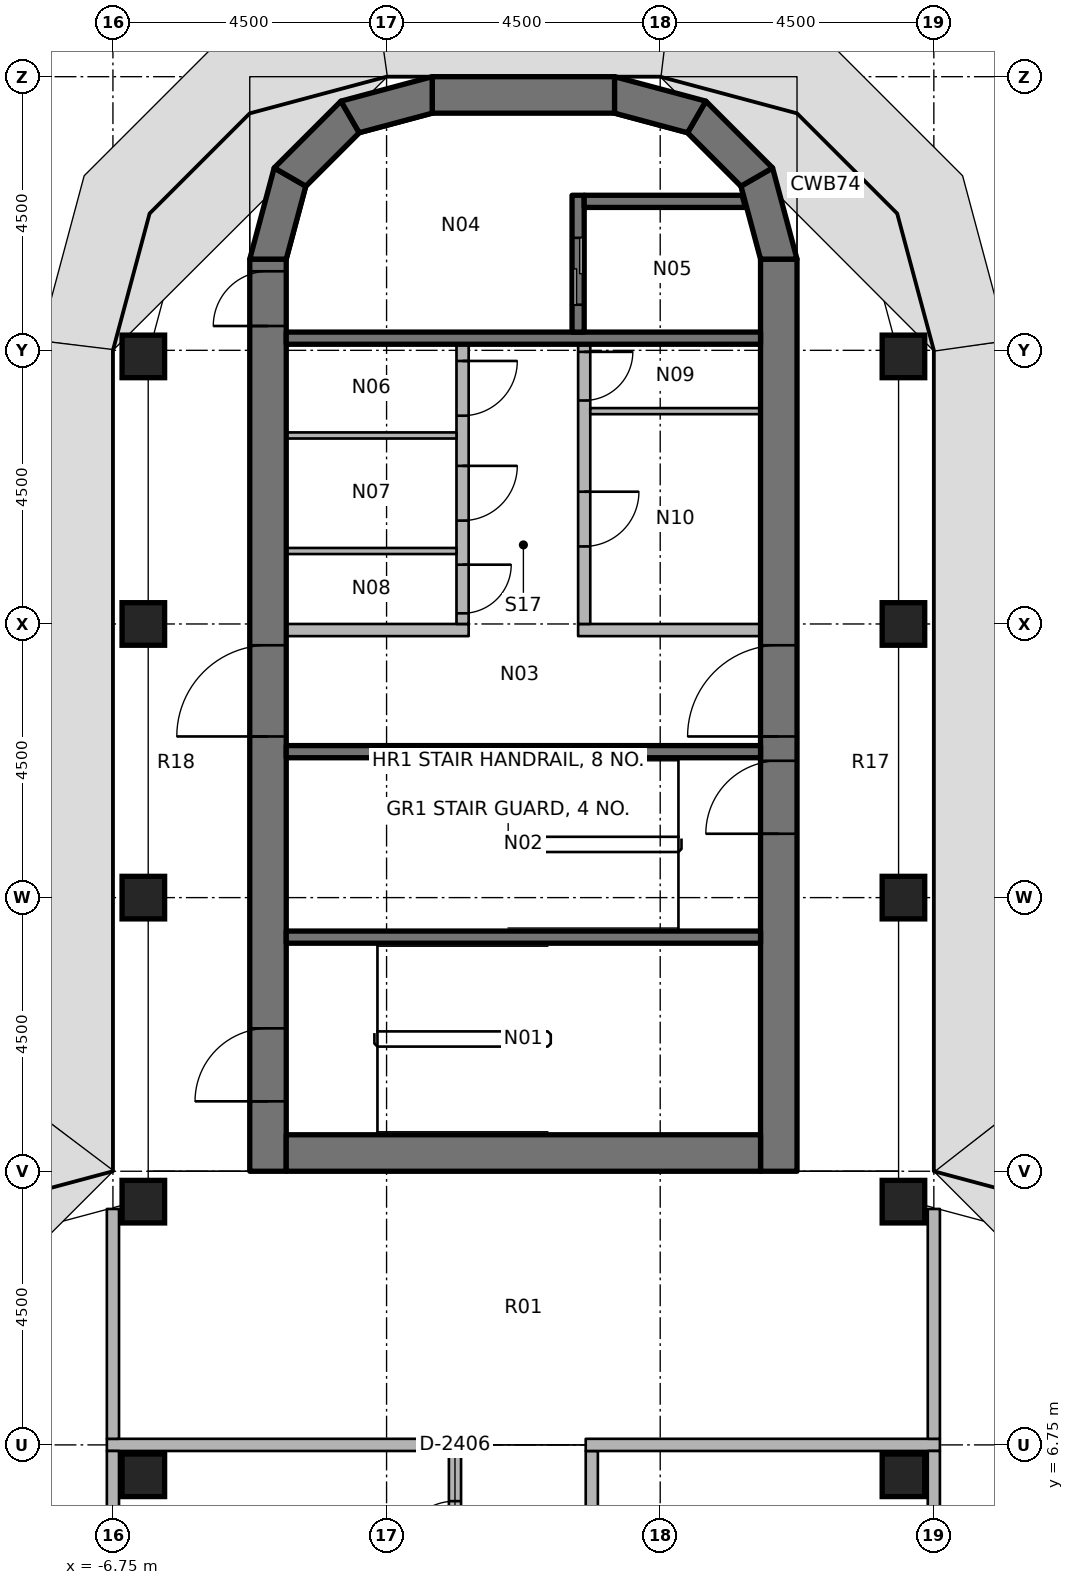
"""IFC4 building model, lengths in metres.
Left out: names, types, materials, properties, quantities, classifications, styles, units other than length and angle.
Written with IfcOpenShell. Run it as: python <this file> out.ifc"""

import sys

from ifc_helpers import new_model, si_unit, direction, frame, frame_2d, origin, origin_2d, place, context, subcontext, project, spatial, polyline, rectangle, outline, extrude, element, fill, save


model = new_model("IFC4")
c1 = context("Model", 3, precision=1e-05, world=origin(), true_north=direction((0.0, 1.0)))
c2 = subcontext(c1, "Body", "Model", "MODEL_VIEW")
j1 = project(units=[si_unit("LENGTHUNIT", "METRE"), si_unit("PLANEANGLEUNIT", "RADIAN")], contexts=[c1])
p1 = place(None, origin())
s1 = spatial("IfcSite", under=j1, at=p1, CompositionType="ELEMENT")
p2 = place(p1, origin())
s2 = spatial("IfcBuilding", under=s1, at=p2, CompositionType="ELEMENT")
p3 = place(p2, frame((0.0, 0.0, 222.0)))
s3 = spatial("IfcBuildingStorey", under=s2, at=p3, CompositionType="ELEMENT", Elevation=222.0)
for number, where, z_axis, x_axis in (
    (1, (-6.25, 6.25, 0.0), (0.0, 0.0, 1.0), (1.0, 0.0, 0.0)),
    (2, (-6.25, 10.75, 0.0), (0.0, 0.0, 1.0), (1.0, 0.0, 0.0)),
    (3, (-6.25, 15.75, 0.0), (0.0, 0.0, 1.0), (1.0, 0.0, 0.0)),
    (4, (-6.25, 20.25, 0.0), (0.0, 0.0, 1.0), (1.0, 0.0, 0.0)),
    (5, (-6.25, 24.65, 0.0), (0.0, 0.0, 1.0), (1.0, 0.0, 0.0)),
    (6, (6.25, 6.25, 0.0), (0.0, 0.0, 1.0), (1.0, 0.0, 0.0)),
    (7, (6.25, 10.75, 0.0), (0.0, 0.0, 1.0), (1.0, 0.0, 0.0)),
    (8, (6.25, 15.75, 0.0), (0.0, 0.0, 1.0), (1.0, 0.0, 0.0)),
    (9, (6.25, 20.25, 0.0), (0.0, 0.0, 1.0), (1.0, 0.0, 0.0)),
    (10, (6.25, 24.65, 0.0), (0.0, 0.0, 1.0), (1.0, 0.0, 0.0)),
):
    element("IfcColumn", number, at=place(p3, frame(where, z_axis=z_axis, x_axis=x_axis)), inside=s3, PredefinedType="COLUMN", context=c2, shape_type="SweptSolid", body=[
        extrude(rectangle(XDim=0.7, YDim=0.7, at=origin_2d()), origin(), (0.0, 0.0, 1.0), 3.65),
    ])
p4 = place(p3, frame((-4.2, 11.25, 0.0), z_axis=(0.0, 0.0, 1.0), x_axis=(0.0, 1.0, 0.0)))
e11 = element("IfcWall", 11, at=p4, inside=s3, PredefinedType="SHEAR", context=c2, shape_type="SweptSolid", body=[
    extrude(rectangle(XDim=15.0, YDim=0.6, at=frame_2d((7.5, 0.0))), origin(), (0.0, 0.0, 1.0), 3.8),
])
p5 = place(p4, frame((7.15, 0.0, 0.0)))
e12 = element("IfcOpeningElement", 12, at=p5, cuts=e11, PredefinedType="OPENING", context=c2, shape_type="SweptSolid", body=[
    extrude(rectangle(XDim=1.5, YDim=2.3, at=frame_2d((0.75, 1.15))), frame((0.0, 0.31, 0.0), z_axis=(0.0, -1.0, 0.0), x_axis=(1.0, 0.0, 0.0)), (0.0, 0.0, 1.0), 0.62),
])
p6 = place(p4, frame((13.9, 0.0, 0.0)))
e13 = element("IfcOpeningElement", 13, at=p6, cuts=e11, PredefinedType="OPENING", context=c2, shape_type="SweptSolid", body=[
    extrude(rectangle(XDim=0.9, YDim=2.1, at=frame_2d((0.45, 1.05))), frame((0.0, 0.31, 0.0), z_axis=(0.0, -1.0, 0.0), x_axis=(1.0, 0.0, 0.0)), (0.0, 0.0, 1.0), 0.62),
])
p7 = place(p4, frame((1.15, 0.0, 0.0)))
e14 = element("IfcOpeningElement", 14, at=p7, cuts=e11, PredefinedType="OPENING", context=c2, shape_type="SweptSolid", body=[
    extrude(rectangle(XDim=1.2, YDim=2.1, at=frame_2d((0.6, 1.05))), frame((0.0, 0.31, 0.0), z_axis=(0.0, -1.0, 0.0), x_axis=(1.0, 0.0, 0.0)), (0.0, 0.0, 1.0), 0.62),
])
p8 = place(p3, frame((4.2, 11.25, 0.0), z_axis=(0.0, 0.0, 1.0), x_axis=(0.0, 1.0, 0.0)))
e15 = element("IfcWall", 15, at=p8, inside=s3, PredefinedType="SHEAR", context=c2, shape_type="SweptSolid", body=[
    extrude(rectangle(XDim=15.0, YDim=0.6, at=frame_2d((7.5, 0.0))), origin(), (0.0, 0.0, 1.0), 3.8),
])
p9 = place(p8, frame((7.15, 0.0, 0.0)))
e16 = element("IfcOpeningElement", 16, at=p9, cuts=e15, PredefinedType="OPENING", context=c2, shape_type="SweptSolid", body=[
    extrude(rectangle(XDim=1.5, YDim=2.3, at=frame_2d((0.75, 1.15))), frame((0.0, 0.31, 0.0), z_axis=(0.0, -1.0, 0.0), x_axis=(1.0, 0.0, 0.0)), (0.0, 0.0, 1.0), 0.62),
])
p10 = place(p8, frame((5.55, 0.0, 0.0)))
e17 = element("IfcOpeningElement", 17, at=p10, cuts=e15, PredefinedType="OPENING", context=c2, shape_type="SweptSolid", body=[
    extrude(rectangle(XDim=1.2, YDim=2.1, at=frame_2d((0.6, 1.05))), frame((0.0, 0.31, 0.0), z_axis=(0.0, -1.0, 0.0), x_axis=(1.0, 0.0, 0.0)), (0.0, 0.0, 1.0), 0.62),
])
p11 = place(p3, frame((-3.9, 11.55, 0.0), z_axis=(0.0, 0.0, 1.0), x_axis=(1.0, 0.0, 0.0)))
e18 = element("IfcWall", 18, at=p11, inside=s3, PredefinedType="SHEAR", context=c2, shape_type="SweptSolid", body=[
    extrude(rectangle(XDim=7.8, YDim=0.6, at=frame_2d((3.9, 0.0))), origin(), (0.0, 0.0, 1.0), 3.8),
])
p12 = place(p3, frame((-1.5, 28.95, 0.0), z_axis=(0.0, 0.0, 1.0), x_axis=(1.0, 0.0, 0.0)))
e19 = element("IfcWall", 19, at=p12, inside=s3, PredefinedType="SHEAR", context=c2, shape_type="SweptSolid", body=[
    extrude(rectangle(XDim=3.0, YDim=0.6, at=frame_2d((1.5, 0.0))), origin(), (0.0, 0.0, 1.0), 3.8),
])
p13 = place(p3, origin())
e20 = element("IfcWall", 20, at=p13, inside=s3, PredefinedType="SHEAR", context=c2, shape_type="SweptSolid", body=[
    extrude(outline(polyline([(-4.5, 26.25), (-4.098, 27.75), (-3.579, 27.45), (-3.9, 26.25), (-4.5, 26.25)])), origin(), (0.0, 0.0, 1.0), 3.8),
])
p14 = place(p3, origin())
e21 = element("IfcWall", 21, at=p14, inside=s3, PredefinedType="SHEAR", context=c2, shape_type="SweptSolid", body=[
    extrude(outline(polyline([(-4.098, 27.75), (-3.0, 28.848), (-2.7, 28.329), (-3.579, 27.45), (-4.098, 27.75)])), origin(), (0.0, 0.0, 1.0), 3.8),
])
p15 = place(p3, origin())
e22 = element("IfcWall", 22, at=p15, inside=s3, PredefinedType="SHEAR", context=c2, shape_type="SweptSolid", body=[
    extrude(outline(polyline([(-3.0, 28.848), (-1.5, 29.25), (-1.5, 28.65), (-2.7, 28.329), (-3.0, 28.848)])), origin(), (0.0, 0.0, 1.0), 3.8),
])
p16 = place(p3, origin())
e23 = element("IfcWall", 23, at=p16, inside=s3, PredefinedType="SHEAR", context=c2, shape_type="SweptSolid", body=[
    extrude(outline(polyline([(4.5, 26.25), (4.098, 27.75), (3.579, 27.45), (3.9, 26.25), (4.5, 26.25)])), origin(), (0.0, 0.0, 1.0), 3.8),
])
p17 = place(p3, origin())
e24 = element("IfcWall", 24, at=p17, inside=s3, PredefinedType="SHEAR", context=c2, shape_type="SweptSolid", body=[
    extrude(outline(polyline([(4.098, 27.75), (3.0, 28.848), (2.7, 28.329), (3.579, 27.45), (4.098, 27.75)])), origin(), (0.0, 0.0, 1.0), 3.8),
])
p18 = place(p3, origin())
e25 = element("IfcWall", 25, at=p18, inside=s3, PredefinedType="SHEAR", context=c2, shape_type="SweptSolid", body=[
    extrude(outline(polyline([(3.0, 28.848), (1.5, 29.25), (1.5, 28.65), (2.7, 28.329), (3.0, 28.848)])), origin(), (0.0, 0.0, 1.0), 3.8),
])
p19 = place(p3, frame((-3.9, 24.95, 0.0), z_axis=(0.0, 0.0, 1.0), x_axis=(1.0, 0.0, 0.0)))
e26 = element("IfcWall", 26, at=p19, inside=s3, PredefinedType="SHEAR", context=c2, shape_type="SweptSolid", body=[
    extrude(rectangle(XDim=7.8, YDim=0.2, at=frame_2d((3.9, 0.0))), origin(), (0.0, 0.0, 1.0), 3.65),
])
p20 = place(p3, frame((0.9, 27.3, 0.0), z_axis=(0.0, 0.0, 1.0), x_axis=(0.0, -1.0, 0.0)))
e27 = element("IfcWall", 27, at=p20, inside=s3, PredefinedType="SHEAR", context=c2, shape_type="SweptSolid", body=[
    extrude(rectangle(XDim=2.25, YDim=0.2, at=frame_2d((1.125, 0.0))), origin(), (0.0, 0.0, 1.0), 3.65),
])
p21 = place(p20, frame((0.7, 0.0, 0.0)))
e28 = element("IfcOpeningElement", 28, at=p21, cuts=e27, PredefinedType="OPENING", context=c2, shape_type="SweptSolid", body=[
    extrude(rectangle(XDim=1.1, YDim=2.3, at=frame_2d((0.55, 1.15))), frame((0.0, 0.11, 0.0), z_axis=(0.0, -1.0, 0.0), x_axis=(1.0, 0.0, 0.0)), (0.0, 0.0, 1.0), 0.22),
])
p22 = place(p3, origin())
e29 = element("IfcWall", 29, at=p22, inside=s3, PredefinedType="SHEAR", context=c2, shape_type="SweptSolid", body=[
    extrude(outline(polyline([(1.0, 27.1), (3.651, 27.1), (3.597, 27.3), (1.0, 27.3), (1.0, 27.1)])), origin(), (0.0, 0.0, 1.0), 3.65),
])
for number, where, z_axis, x_axis in (
    (30, (-3.9, 18.15, 0.0), (0.0, 0.0, 1.0), (1.0, 0.0, 0.0)),
    (31, (-3.9, 15.1, 0.0), (0.0, 0.0, 1.0), (1.0, 0.0, 0.0)),
):
    element("IfcWall", number, at=place(p3, frame(where, z_axis=z_axis, x_axis=x_axis)), inside=s3, PredefinedType="SHEAR", context=c2, shape_type="SweptSolid", body=[
        extrude(rectangle(XDim=7.8, YDim=0.2, at=frame_2d((3.9, 0.0))), origin(), (0.0, 0.0, 1.0), 3.65),
    ])
p23 = place(p3, frame((-3.9, 20.15, 0.0), z_axis=(0.0, 0.0, 1.0), x_axis=(1.0, 0.0, 0.0)))
e32 = element("IfcWall", 32, at=p23, inside=s3, PredefinedType="PARTITIONING", context=c2, shape_type="SweptSolid", body=[
    extrude(rectangle(XDim=3.0, YDim=0.2, at=frame_2d((1.5, 0.0))), origin(), (0.0, 0.0, 1.0), 3.65),
])
p24 = place(p3, frame((-1.0, 24.85, 0.0), z_axis=(0.0, 0.0, 1.0), x_axis=(0.0, -1.0, 0.0)))
e33 = element("IfcWall", 33, at=p24, inside=s3, PredefinedType="PARTITIONING", context=c2, shape_type="SweptSolid", body=[
    extrude(rectangle(XDim=4.6, YDim=0.2, at=frame_2d((2.3, 0.0))), origin(), (0.0, 0.0, 1.0), 3.65),
])
p25 = place(p24, frame((0.275, 0.0, 0.0)))
e34 = element("IfcOpeningElement", 34, at=p25, cuts=e33, PredefinedType="OPENING", context=c2, shape_type="SweptSolid", body=[
    extrude(rectangle(XDim=0.9, YDim=2.1, at=frame_2d((0.45, 1.05))), frame((0.0, 0.11, 0.0), z_axis=(0.0, -1.0, 0.0), x_axis=(1.0, 0.0, 0.0)), (0.0, 0.0, 1.0), 0.22),
])
p26 = place(p24, frame((2.0, 0.0, 0.0)))
e35 = element("IfcOpeningElement", 35, at=p26, cuts=e33, PredefinedType="OPENING", context=c2, shape_type="SweptSolid", body=[
    extrude(rectangle(XDim=0.9, YDim=2.1, at=frame_2d((0.45, 1.05))), frame((0.0, 0.11, 0.0), z_axis=(0.0, -1.0, 0.0), x_axis=(1.0, 0.0, 0.0)), (0.0, 0.0, 1.0), 0.22),
])
p27 = place(p24, frame((3.625, 0.0, 0.0)))
e36 = element("IfcOpeningElement", 36, at=p27, cuts=e33, PredefinedType="OPENING", context=c2, shape_type="SweptSolid", body=[
    extrude(rectangle(XDim=0.8, YDim=2.1, at=frame_2d((0.4, 1.05))), frame((0.0, 0.11, 0.0), z_axis=(0.0, -1.0, 0.0), x_axis=(1.0, 0.0, 0.0)), (0.0, 0.0, 1.0), 0.22),
])
p28 = place(p3, frame((0.9, 20.15, 0.0), z_axis=(0.0, 0.0, 1.0), x_axis=(1.0, 0.0, 0.0)))
e37 = element("IfcWall", 37, at=p28, inside=s3, PredefinedType="PARTITIONING", context=c2, shape_type="SweptSolid", body=[
    extrude(rectangle(XDim=3.0, YDim=0.2, at=frame_2d((1.5, 0.0))), origin(), (0.0, 0.0, 1.0), 3.65),
])
p29 = place(p3, frame((1.0, 24.85, 0.0), z_axis=(0.0, 0.0, 1.0), x_axis=(0.0, -1.0, 0.0)))
e38 = element("IfcWall", 38, at=p29, inside=s3, PredefinedType="PARTITIONING", context=c2, shape_type="SweptSolid", body=[
    extrude(rectangle(XDim=4.6, YDim=0.2, at=frame_2d((2.3, 0.0))), origin(), (0.0, 0.0, 1.0), 3.65),
])
p30 = place(p29, frame((0.125, 0.0, 0.0)))
e39 = element("IfcOpeningElement", 39, at=p30, cuts=e38, PredefinedType="OPENING", context=c2, shape_type="SweptSolid", body=[
    extrude(rectangle(XDim=0.8, YDim=2.1, at=frame_2d((0.4, 1.05))), frame((0.0, 0.11, 0.0), z_axis=(0.0, -1.0, 0.0), x_axis=(1.0, 0.0, 0.0)), (0.0, 0.0, 1.0), 0.22),
])
p31 = place(p29, frame((2.425, 0.0, 0.0)))
e40 = element("IfcOpeningElement", 40, at=p31, cuts=e38, PredefinedType="OPENING", context=c2, shape_type="SweptSolid", body=[
    extrude(rectangle(XDim=0.9, YDim=2.1, at=frame_2d((0.45, 1.05))), frame((0.0, 0.11, 0.0), z_axis=(0.0, -1.0, 0.0), x_axis=(1.0, 0.0, 0.0)), (0.0, 0.0, 1.0), 0.22),
])
for number, where, z_axis, x_axis in (
    (41, (-3.9, 23.35, 0.0), (0.0, 0.0, 1.0), (1.0, 0.0, 0.0)),
    (42, (-3.9, 21.45, 0.0), (0.0, 0.0, 1.0), (1.0, 0.0, 0.0)),
    (43, (1.1, 23.75, 0.0), (0.0, 0.0, 1.0), (1.0, 0.0, 0.0)),
):
    element("IfcWall", number, at=place(p3, frame(where, z_axis=z_axis, x_axis=x_axis)), inside=s3, PredefinedType="PARTITIONING", context=c2, shape_type="SweptSolid", body=[
        extrude(rectangle(XDim=2.8, YDim=0.1, at=frame_2d((1.4, 0.0))), origin(), (0.0, 0.0, 1.0), 3.65),
    ])
p32 = place(p3, frame((1.125, 1.225, 0.0), z_axis=(0.0, 0.0, 1.0), x_axis=(0.0, 1.0, 0.0)))
e44 = element("IfcWall", 44, at=p32, inside=s3, PredefinedType="PARTITIONING", context=c2, shape_type="SweptSolid", body=[
    extrude(rectangle(XDim=5.425, YDim=0.2, at=frame_2d((2.712, 0.0))), origin(), (0.0, 0.0, 1.0), 2.75),
])
p33 = place(p3, frame((-1.125, 4.1, 0.0), z_axis=(0.0, 0.0, 1.0), x_axis=(0.0, 1.0, 0.0)))
e45 = element("IfcWall", 45, at=p33, inside=s3, PredefinedType="PARTITIONING", context=c2, shape_type="SweptSolid", body=[
    extrude(rectangle(XDim=2.55, YDim=0.2, at=frame_2d((1.275, 0.0))), origin(), (0.0, 0.0, 1.0), 2.75),
])
p34 = place(p33, frame((0.825, 0.0, 0.0)))
e46 = element("IfcOpeningElement", 46, at=p34, cuts=e45, PredefinedType="OPENING", context=c2, shape_type="SweptSolid", body=[
    extrude(rectangle(XDim=0.9, YDim=2.1, at=frame_2d((0.45, 1.05))), frame((0.0, 0.11, 0.0), z_axis=(0.0, -1.0, 0.0), x_axis=(1.0, 0.0, 0.0)), (0.0, 0.0, 1.0), 0.22),
])
p35 = place(p3, frame((1.025, 6.75, 0.0), z_axis=(0.0, 0.0, 1.0), x_axis=(1.0, 0.0, 0.0)))
e47 = element("IfcWall", 47, at=p35, inside=s3, PredefinedType="PARTITIONING", context=c2, shape_type="SweptSolid", body=[
    extrude(rectangle(XDim=5.825, YDim=0.2, at=frame_2d((2.913, 0.0))), origin(), (0.0, 0.0, 1.0), 2.75),
])
p36 = place(p3, frame((6.75, 6.85, 0.0), z_axis=(0.0, 0.0, 1.0), x_axis=(0.0, 1.0, 0.0)))
e48 = element("IfcWall", 48, at=p36, inside=s3, PredefinedType="PARTITIONING", context=c2, shape_type="SweptSolid", body=[
    extrude(rectangle(XDim=3.78, YDim=0.2, at=frame_2d((1.89, 0.0))), origin(), (0.0, 0.0, 1.0), 2.75),
])
p37 = place(p3, frame((-6.85, 6.75, 0.0), z_axis=(0.0, 0.0, 1.0), x_axis=(1.0, 0.0, 0.0)))
e49 = element("IfcWall", 49, at=p37, inside=s3, PredefinedType="PARTITIONING", context=c2, shape_type="SweptSolid", body=[
    extrude(rectangle(XDim=5.825, YDim=0.2, at=frame_2d((2.913, 0.0))), origin(), (0.0, 0.0, 1.0), 2.75),
])
p38 = place(p3, frame((-6.75, 6.85, 0.0), z_axis=(0.0, 0.0, 1.0), x_axis=(0.0, 1.0, 0.0)))
e50 = element("IfcWall", 50, at=p38, inside=s3, PredefinedType="PARTITIONING", context=c2, shape_type="SweptSolid", body=[
    extrude(rectangle(XDim=3.78, YDim=0.2, at=frame_2d((1.89, 0.0))), origin(), (0.0, 0.0, 1.0), 2.75),
])
p39 = place(p3, frame((6.75, 1.225, 0.0), z_axis=(0.0, 0.0, 1.0), x_axis=(0.0, 1.0, 0.0)))
e51 = element("IfcWall", 51, at=p39, inside=s3, PredefinedType="PARTITIONING", context=c2, shape_type="SweptSolid", body=[
    extrude(rectangle(XDim=5.425, YDim=0.2, at=frame_2d((2.712, 0.0))), origin(), (0.0, 0.0, 1.0), 2.75),
])
p40 = place(p3, frame((-6.75, 4.1, 0.0), z_axis=(0.0, 0.0, 1.0), x_axis=(0.0, 1.0, 0.0)))
e52 = element("IfcWall", 52, at=p40, inside=s3, PredefinedType="PARTITIONING", context=c2, shape_type="SweptSolid", body=[
    extrude(rectangle(XDim=2.55, YDim=0.2, at=frame_2d((1.275, 0.0))), origin(), (0.0, 0.0, 1.0), 2.75),
])
p41 = place(p5, origin())
e53 = element("IfcDoor", 53, at=p41, inside=s3, OperationType="DOUBLE_DOOR_SINGLE_SWING", PredefinedType="DOOR", context=c2, shape_type="SweptSolid", body=[
    extrude(rectangle(XDim=1.5, YDim=2.3, at=frame_2d((0.75, 1.15))), frame((0.0, 0.025, 0.0), z_axis=(0.0, -1.0, 0.0), x_axis=(1.0, 0.0, 0.0)), (0.0, 0.0, 1.0), 0.05),
])
fill(e12, e53)
p42 = place(p9, origin())
e54 = element("IfcDoor", 54, at=p42, inside=s3, OperationType="DOUBLE_DOOR_SINGLE_SWING", PredefinedType="DOOR", context=c2, shape_type="SweptSolid", body=[
    extrude(rectangle(XDim=1.5, YDim=2.3, at=frame_2d((0.75, 1.15))), frame((0.0, 0.025, 0.0), z_axis=(0.0, -1.0, 0.0), x_axis=(1.0, 0.0, 0.0)), (0.0, 0.0, 1.0), 0.05),
])
fill(e16, e54)
p43 = place(p6, origin())
e55 = element("IfcDoor", 55, at=p43, inside=s3, OperationType="SINGLE_SWING_RIGHT", PredefinedType="DOOR", context=c2, shape_type="SweptSolid", body=[
    extrude(rectangle(XDim=0.9, YDim=2.1, at=frame_2d((0.45, 1.05))), frame((0.0, 0.025, 0.0), z_axis=(0.0, -1.0, 0.0), x_axis=(1.0, 0.0, 0.0)), (0.0, 0.0, 1.0), 0.05),
])
fill(e13, e55)
p44 = place(p10, origin())
e56 = element("IfcDoor", 56, at=p44, inside=s3, OperationType="SINGLE_SWING_LEFT", PredefinedType="DOOR", context=c2, shape_type="SweptSolid", body=[
    extrude(rectangle(XDim=1.2, YDim=2.1, at=frame_2d((0.6, 1.05))), frame((0.0, 0.025, 0.0), z_axis=(0.0, -1.0, 0.0), x_axis=(1.0, 0.0, 0.0)), (0.0, 0.0, 1.0), 0.05),
])
fill(e17, e56)
p45 = place(p7, origin())
e57 = element("IfcDoor", 57, at=p45, inside=s3, OperationType="SINGLE_SWING_RIGHT", PredefinedType="DOOR", context=c2, shape_type="SweptSolid", body=[
    extrude(rectangle(XDim=1.2, YDim=2.1, at=frame_2d((0.6, 1.05))), frame((0.0, 0.025, 0.0), z_axis=(0.0, -1.0, 0.0), x_axis=(1.0, 0.0, 0.0)), (0.0, 0.0, 1.0), 0.05),
])
fill(e14, e57)
p46 = place(p21, origin())
e58 = element("IfcDoor", 58, at=p46, inside=s3, OperationType="DOUBLE_DOOR_SLIDING", PredefinedType="DOOR", context=c2, shape_type="SweptSolid", body=[
    extrude(rectangle(XDim=1.1, YDim=2.3, at=frame_2d((0.55, 1.15))), frame((0.0, 0.025, 0.0), z_axis=(0.0, -1.0, 0.0), x_axis=(1.0, 0.0, 0.0)), (0.0, 0.0, 1.0), 0.05),
])
fill(e28, e58)
p47 = place(p25, origin())
e59 = element("IfcDoor", 59, at=p47, inside=s3, OperationType="SINGLE_SWING_LEFT", PredefinedType="DOOR", context=c2, shape_type="SweptSolid", body=[
    extrude(rectangle(XDim=0.9, YDim=2.1, at=frame_2d((0.45, 1.05))), frame((0.0, 0.025, 0.0), z_axis=(0.0, -1.0, 0.0), x_axis=(1.0, 0.0, 0.0)), (0.0, 0.0, 1.0), 0.05),
])
fill(e34, e59)
p48 = place(p26, origin())
e60 = element("IfcDoor", 60, at=p48, inside=s3, OperationType="SINGLE_SWING_RIGHT", PredefinedType="DOOR", context=c2, shape_type="SweptSolid", body=[
    extrude(rectangle(XDim=0.9, YDim=2.1, at=frame_2d((0.45, 1.05))), frame((0.0, 0.025, 0.0), z_axis=(0.0, -1.0, 0.0), x_axis=(1.0, 0.0, 0.0)), (0.0, 0.0, 1.0), 0.05),
])
fill(e35, e60)
p49 = place(p27, origin())
e61 = element("IfcDoor", 61, at=p49, inside=s3, OperationType="SINGLE_SWING_LEFT", PredefinedType="DOOR", context=c2, shape_type="SweptSolid", body=[
    extrude(rectangle(XDim=0.8, YDim=2.1, at=frame_2d((0.4, 1.05))), frame((0.0, 0.025, 0.0), z_axis=(0.0, -1.0, 0.0), x_axis=(1.0, 0.0, 0.0)), (0.0, 0.0, 1.0), 0.05),
])
fill(e36, e61)
p50 = place(p30, origin())
e62 = element("IfcDoor", 62, at=p50, inside=s3, OperationType="SINGLE_SWING_LEFT", PredefinedType="DOOR", context=c2, shape_type="SweptSolid", body=[
    extrude(rectangle(XDim=0.8, YDim=2.1, at=frame_2d((0.4, 1.05))), frame((0.0, 0.025, 0.0), z_axis=(0.0, -1.0, 0.0), x_axis=(1.0, 0.0, 0.0)), (0.0, 0.0, 1.0), 0.05),
])
fill(e39, e62)
p51 = place(p31, origin())
e63 = element("IfcDoor", 63, at=p51, inside=s3, OperationType="SINGLE_SWING_RIGHT", PredefinedType="DOOR", context=c2, shape_type="SweptSolid", body=[
    extrude(rectangle(XDim=0.9, YDim=2.1, at=frame_2d((0.45, 1.05))), frame((0.0, 0.025, 0.0), z_axis=(0.0, -1.0, 0.0), x_axis=(1.0, 0.0, 0.0)), (0.0, 0.0, 1.0), 0.05),
])
fill(e40, e63)
p52 = place(p34, origin())
e64 = element("IfcDoor", 64, at=p52, inside=s3, OperationType="SINGLE_SWING_RIGHT", PredefinedType="DOOR", context=c2, shape_type="SweptSolid", body=[
    extrude(rectangle(XDim=0.9, YDim=2.1, at=frame_2d((0.45, 1.05))), frame((0.0, 0.025, 0.0), z_axis=(0.0, -1.0, 0.0), x_axis=(1.0, 0.0, 0.0)), (0.0, 0.0, 1.0), 0.05),
])
fill(e46, e64)
save(model, sys.argv[1])
